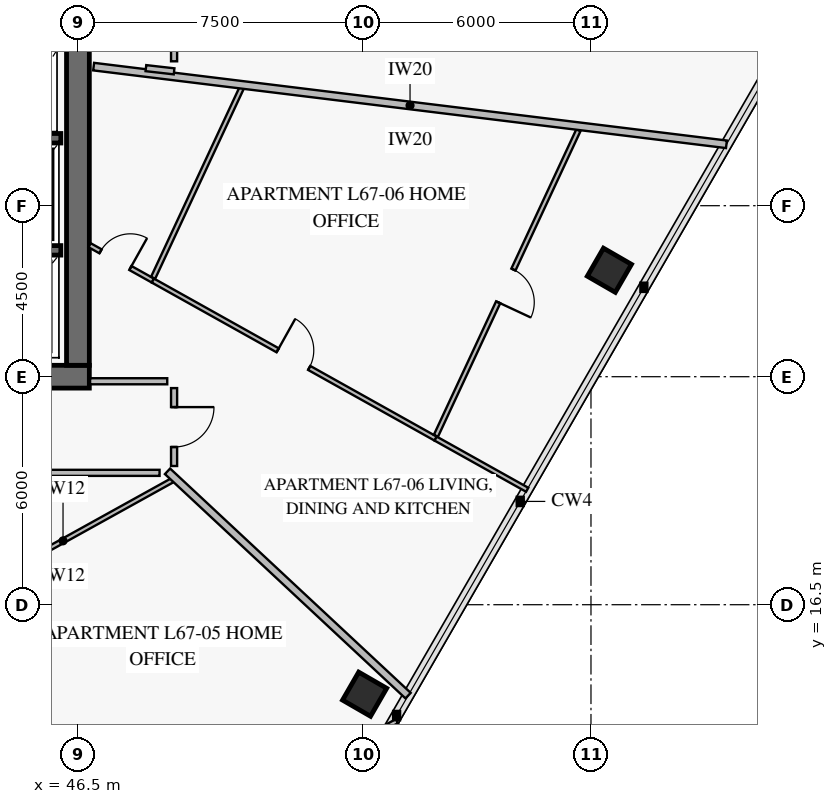
"""IFC4 building model, lengths in metres.
Left out: names, types, materials, properties, quantities, classifications, styles, units other than length and angle.
Written with IfcOpenShell. Run it as: python <this file> out.ifc"""

import sys

from ifc_helpers import new_model, si_unit, direction, frame, frame_2d, origin, origin_2d, place, context, subcontext, project, spatial, rectangle, extrude, element, fill, save


model = new_model("IFC4")
c1 = context("Model", 3, precision=1e-05, world=origin(), true_north=direction((0.0, 1.0)))
c2 = subcontext(c1, "Body", "Model", "MODEL_VIEW")
j1 = project(units=[si_unit("LENGTHUNIT", "METRE"), si_unit("PLANEANGLEUNIT", "RADIAN")], contexts=[c1])
p1 = place(None, origin())
s1 = spatial("IfcSite", under=j1, at=p1, CompositionType="ELEMENT")
p2 = place(p1, origin())
s2 = spatial("IfcBuilding", under=s1, at=p2, CompositionType="ELEMENT")
p3 = place(p2, frame((0.0, 0.0, 265.4)))
s3 = spatial("IfcBuildingStorey", under=s2, at=p3, CompositionType="ELEMENT", Elevation=265.4)
p4 = place(p3, frame((37.35, 22.5, 0.0), z_axis=(0.0, 0.0, 1.0), x_axis=(1.0, 0.0, 0.0)))
e1 = element("IfcWall", 1, at=p4, inside=s3, PredefinedType="SHEAR", context=c2, shape_type="SweptSolid", body=[
    extrude(rectangle(XDim=9.45, YDim=0.6, at=frame_2d((4.725, 0.0))), origin(), (0.0, 0.0, 1.0), 3.8),
])
p5 = place(p4, frame((3.95, 0.0, 0.0)))
e2 = element("IfcOpeningElement", 2, at=p5, cuts=e1, PredefinedType="OPENING", context=c2, shape_type="SweptSolid", body=[
    extrude(rectangle(XDim=1.5, YDim=2.15, at=frame_2d((0.75, 1.075))), frame((0.0, 0.312, 0.0), z_axis=(0.0, -1.0, 0.0), x_axis=(1.0, 0.0, 0.0)), (0.0, 0.0, 1.0), 0.624),
])
p6 = place(p3, frame((46.5, 22.8, 0.0), z_axis=(0.0, 0.0, 1.0), x_axis=(0.0, 1.0, 0.0)))
e3 = element("IfcWall", 3, at=p6, inside=s3, PredefinedType="SHEAR", context=c2, shape_type="SweptSolid", body=[
    extrude(rectangle(XDim=18.4, YDim=0.6, at=frame_2d((9.2, 0.0))), origin(), (0.0, 0.0, 1.0), 3.8),
])
p7 = place(p6, frame((8.95, 0.0, 0.0)))
e4 = element("IfcOpeningElement", 4, at=p7, cuts=e3, PredefinedType="OPENING", context=c2, shape_type="SweptSolid", body=[
    extrude(rectangle(XDim=1.1, YDim=2.15, at=frame_2d((0.55, 1.075))), frame((0.0, 0.312, 0.0), z_axis=(0.0, -1.0, 0.0), x_axis=(1.0, 0.0, 0.0)), (0.0, 0.0, 1.0), 0.624),
])
for number, where, z_axis, x_axis in (
    (5, (54.044, 14.145, 0.0), (0.0, 0.0, 1.0), (0.5, 0.866, 0.0)),
    (6, (60.485, 25.301, 0.0), (0.0, 0.0, 1.0), (0.5, 0.866, 0.0)),
):
    element("IfcColumn", number, at=place(p3, frame(where, z_axis=z_axis, x_axis=x_axis)), inside=s3, PredefinedType="COLUMN", context=c2, shape_type="SweptSolid", body=[
        extrude(rectangle(XDim=0.85, YDim=0.85, at=origin_2d()), origin(), (0.0, 0.0, 1.0), 3.55),
    ])
for number, where, z_axis, x_axis in (
    (7, (43.8, 25.825, 0.0), (0.0, 0.0, 1.0), (1.0, 0.0, 0.0)),
    (8, (43.8, 28.775, 0.0), (0.0, 0.0, 1.0), (1.0, 0.0, 0.0)),
):
    element("IfcWall", number, at=place(p3, frame(where, z_axis=z_axis, x_axis=x_axis)), inside=s3, PredefinedType="SOLIDWALL", context=c2, shape_type="SweptSolid", body=[
        extrude(rectangle(XDim=2.25, YDim=0.25, at=frame_2d((1.125, 0.0))), origin(), (0.0, 0.0, 1.0), 3.8),
    ])
p8 = place(p3, frame((43.155, 16.515, 0.0), z_axis=(0.0, 0.0, 1.0), x_axis=(0.419453006553, -0.907777051535, 0.0)))
e9 = element("IfcWall", 9, at=p8, inside=s3, PredefinedType="PARTITIONING", context=c2, shape_type="SweptSolid", body=[
    extrude(rectangle(XDim=8.43, YDim=0.12, at=frame_2d((4.215, 0.0))), origin(), (0.0, 0.0, 1.0), 2.93),
])
p9 = place(p8, frame((3.715, 0.0, 0.0)))
e10 = element("IfcOpeningElement", 10, at=p9, cuts=e9, PredefinedType="OPENING", context=c2, shape_type="SweptSolid", body=[
    extrude(rectangle(XDim=0.95, YDim=2.1, at=frame_2d((0.475, 1.05))), frame((0.0, 0.072, 0.0), z_axis=(0.0, -1.0, 0.0), x_axis=(1.0, 0.0, 0.0)), (0.0, 0.0, 1.0), 0.144),
])
p10 = place(p3, frame((46.74, 8.918, 0.0), z_axis=(0.0, 0.0, 1.0), x_axis=(0.874617638419, 0.484813352298, 0.0)))
e11 = element("IfcWall", 11, at=p10, inside=s3, PredefinedType="PARTITIONING", context=c2, shape_type="SweptSolid", body=[
    extrude(rectangle(XDim=9.323, YDim=0.12, at=frame_2d((4.661, 0.0))), origin(), (0.0, 0.0, 1.0), 3.55),
])
p11 = place(p10, frame((3.882, 0.0, 0.0)))
e12 = element("IfcOpeningElement", 12, at=p11, cuts=e11, PredefinedType="OPENING", context=c2, shape_type="SweptSolid", body=[
    extrude(rectangle(XDim=0.95, YDim=2.1, at=frame_2d((0.475, 1.05))), frame((0.0, 0.072, 0.0), z_axis=(0.0, -1.0, 0.0), x_axis=(1.0, 0.0, 0.0)), (0.0, 0.0, 1.0), 0.144),
])
p12 = place(p3, frame((46.808, 25.96, 0.0), z_axis=(0.0, 0.0, 1.0), x_axis=(0.872879297485, -0.487936196672, 0.0)))
e13 = element("IfcWall", 13, at=p12, inside=s3, PredefinedType="PARTITIONING", context=c2, shape_type="SweptSolid", body=[
    extrude(rectangle(XDim=1.906, YDim=0.12, at=frame_2d((0.953, 0.0))), origin(), (0.0, 0.0, 1.0), 3.55),
])
p13 = place(p12, frame((0.329, 0.0, 0.0)))
e14 = element("IfcOpeningElement", 14, at=p13, cuts=e13, PredefinedType="OPENING", context=c2, shape_type="SweptSolid", body=[
    extrude(rectangle(XDim=0.9, YDim=2.1, at=frame_2d((0.45, 1.05))), frame((0.0, 0.072, 0.0), z_axis=(0.0, -1.0, 0.0), x_axis=(1.0, 0.0, 0.0)), (0.0, 0.0, 1.0), 0.144),
])
p14 = place(p3, frame((48.472, 25.03, 0.0), z_axis=(0.0, 0.0, 1.0), x_axis=(0.872916935633, -0.487868858901, 0.0)))
e15 = element("IfcWall", 15, at=p14, inside=s3, PredefinedType="PARTITIONING", context=c2, shape_type="SweptSolid", body=[
    extrude(rectangle(XDim=8.524, YDim=0.12, at=frame_2d((4.262, 0.0))), origin(), (0.0, 0.0, 1.0), 3.15),
])
p15 = place(p14, frame((3.762, 0.0, 0.0)))
e16 = element("IfcOpeningElement", 16, at=p15, cuts=e15, PredefinedType="OPENING", context=c2, shape_type="SweptSolid", body=[
    extrude(rectangle(XDim=0.95, YDim=2.1, at=frame_2d((0.475, 1.05))), frame((0.0, 0.072, 0.0), z_axis=(0.0, -1.0, 0.0), x_axis=(1.0, 0.0, 0.0)), (0.0, 0.0, 1.0), 0.144),
])
p16 = place(p3, frame((55.92, 20.945, 0.0), z_axis=(0.0, 0.0, 1.0), x_axis=(0.422606705523, 0.9063131757, 0.0)))
e17 = element("IfcWall", 17, at=p16, inside=s3, PredefinedType="PARTITIONING", context=c2, shape_type="SweptSolid", body=[
    extrude(rectangle(XDim=8.871, YDim=0.12, at=frame_2d((4.435, 0.0))), origin(), (0.0, 0.0, 1.0), 2.95),
])
p17 = place(p16, frame((3.876, 0.0, 0.0)))
e18 = element("IfcOpeningElement", 18, at=p17, cuts=e17, PredefinedType="OPENING", context=c2, shape_type="SweptSolid", body=[
    extrude(rectangle(XDim=0.95, YDim=2.1, at=frame_2d((0.475, 1.05))), frame((0.0, 0.072, 0.0), z_axis=(0.0, -1.0, 0.0), x_axis=(1.0, 0.0, 0.0)), (0.0, 0.0, 1.0), 0.144),
])
p18 = place(p3, frame((49.03, 20.15, 0.0), z_axis=(0.0, 0.0, 1.0), x_axis=(0.0, 1.0, 0.0)))
e19 = element("IfcWall", 19, at=p18, inside=s3, PredefinedType="PARTITIONING", context=c2, shape_type="SweptSolid", body=[
    extrude(rectangle(XDim=2.05, YDim=0.16, at=frame_2d((1.025, 0.0))), origin(), (0.0, 0.0, 1.0), 3.55),
])
p19 = place(p18, frame((0.5, 0.0, 0.0)))
e20 = element("IfcOpeningElement", 20, at=p19, cuts=e19, PredefinedType="OPENING", context=c2, shape_type="SweptSolid", body=[
    extrude(rectangle(XDim=1.05, YDim=2.15, at=frame_2d((0.525, 1.075))), frame((0.0, 0.092, 0.0), z_axis=(0.0, -1.0, 0.0), x_axis=(1.0, 0.0, 0.0)), (0.0, 0.0, 1.0), 0.184),
])
p20 = place(p3, frame((49.03, 30.8, 0.0), z_axis=(0.0, 0.0, 1.0), x_axis=(0.0, 1.0, 0.0)))
e21 = element("IfcWall", 21, at=p20, inside=s3, PredefinedType="PARTITIONING", context=c2, shape_type="SweptSolid", body=[
    extrude(rectangle(XDim=2.734, YDim=0.16, at=frame_2d((1.367, 0.0))), origin(), (0.0, 0.0, 1.0), 3.55),
])
p21 = place(p20, frame((0.842, 0.0, 0.0)))
e22 = element("IfcOpeningElement", 22, at=p21, cuts=e21, PredefinedType="OPENING", context=c2, shape_type="SweptSolid", body=[
    extrude(rectangle(XDim=1.05, YDim=2.15, at=frame_2d((0.525, 1.075))), frame((0.0, 0.092, 0.0), z_axis=(0.0, -1.0, 0.0), x_axis=(1.0, 0.0, 0.0)), (0.0, 0.0, 1.0), 0.184),
])
p22 = place(p3, frame((43.204, 16.571, 0.0), z_axis=(0.0, 0.0, 1.0), x_axis=(0.874626847506, 0.48479673846, 0.0)))
e23 = element("IfcWall", 23, at=p22, inside=s3, PredefinedType="PARTITIONING", context=c2, shape_type="SweptSolid", body=[
    extrude(rectangle(XDim=6.64, YDim=0.12, at=frame_2d((3.32, 0.0))), origin(), (0.0, 0.0, 1.0), 2.95),
])
p23 = place(p3, frame((48.857, 20.01, 0.0), z_axis=(0.0, 0.0, 1.0), x_axis=(0.731342217011, -0.682010675589, 0.0)))
e24 = element("IfcWall", 24, at=p23, inside=s3, PredefinedType="PARTITIONING", context=c2, shape_type="SweptSolid", body=[
    extrude(rectangle(XDim=8.656, YDim=0.2, at=frame_2d((4.328, 0.0))), origin(), (0.0, 0.0, 1.0), 2.93),
])
p24 = place(p3, frame((55.913, 20.871, 0.0), z_axis=(0.0, 0.0, 1.0), x_axis=(0.872940157906, -0.487827306242, 0.0)))
e25 = element("IfcWall", 25, at=p24, inside=s3, PredefinedType="PARTITIONING", context=c2, shape_type="SweptSolid", body=[
    extrude(rectangle(XDim=2.76, YDim=0.12, at=frame_2d((1.38, 0.0))), origin(), (0.0, 0.0, 1.0), 2.93),
])
p25 = place(p3, frame((48.479, 25.104, 0.0), z_axis=(0.0, 0.0, 1.0), x_axis=(0.422623708153, 0.906305247313, 0.0)))
e26 = element("IfcWall", 26, at=p25, inside=s3, PredefinedType="PARTITIONING", context=c2, shape_type="SweptSolid", body=[
    extrude(rectangle(XDim=5.566, YDim=0.12, at=frame_2d((2.783, 0.0))), origin(), (0.0, 0.0, 1.0), 2.95),
])
p26 = place(p3, frame((46.913, 30.66, 0.0), z_axis=(0.0, 0.0, 1.0), x_axis=(0.992546420308, -0.121867155269, 0.0)))
e27 = element("IfcWall", 27, at=p26, inside=s3, PredefinedType="PARTITIONING", context=c2, shape_type="SweptSolid", body=[
    extrude(rectangle(XDim=16.776, YDim=0.2, at=frame_2d((8.388, 0.0))), origin(), (0.0, 0.0, 1.0), 2.93),
])
p27 = place(p3, frame((41.634, 19.97, 0.0), z_axis=(0.0, 0.0, 1.0), x_axis=(1.0, 0.0, 0.0)))
e28 = element("IfcWall", 28, at=p27, inside=s3, PredefinedType="PARTITIONING", context=c2, shape_type="SweptSolid", body=[
    extrude(rectangle(XDim=7.014, YDim=0.16, at=frame_2d((3.507, 0.0))), origin(), (0.0, 0.0, 1.0), 2.95),
])
p28 = place(p3, frame((48.85, 22.38, 0.0), z_axis=(0.0, 0.0, 1.0), x_axis=(-1.0, 0.0, 0.0)))
e29 = element("IfcWall", 29, at=p28, inside=s3, PredefinedType="PARTITIONING", context=c2, shape_type="SweptSolid", body=[
    extrude(rectangle(XDim=2.03, YDim=0.16, at=frame_2d((1.015, 0.0))), origin(), (0.0, 0.0, 1.0), 3.55),
])
p29 = place(p3, frame((49.03, 30.536, 0.0), z_axis=(0.0, 0.0, 1.0), x_axis=(-0.993568487463, 0.113232772287, 0.0)))
e30 = element("IfcWall", 30, at=p29, inside=s3, PredefinedType="PARTITIONING", context=c2, shape_type="SweptSolid", body=[
    extrude(rectangle(XDim=0.746, YDim=0.16, at=frame_2d((0.373, 0.0))), origin(), (0.0, 0.0, 1.0), 3.55),
])
p30 = place(p13, origin())
e31 = element("IfcDoor", 31, at=p30, inside=s3, OperationType="SINGLE_SWING_RIGHT", PredefinedType="DOOR", context=c2, shape_type="SweptSolid", body=[
    extrude(rectangle(XDim=0.9, YDim=2.1, at=frame_2d((0.45, 1.05))), frame((0.0, 0.025, 0.0), z_axis=(0.0, -1.0, 0.0), x_axis=(1.0, 0.0, 0.0)), (0.0, 0.0, 1.0), 0.05),
])
fill(e14, e31)
p31 = place(p15, origin())
e32 = element("IfcDoor", 32, at=p31, inside=s3, OperationType="SINGLE_SWING_LEFT", PredefinedType="DOOR", context=c2, shape_type="SweptSolid", body=[
    extrude(rectangle(XDim=0.95, YDim=2.1, at=frame_2d((0.475, 1.05))), frame((0.0, 0.025, 0.0), z_axis=(0.0, -1.0, 0.0), x_axis=(1.0, 0.0, 0.0)), (0.0, 0.0, 1.0), 0.05),
])
fill(e16, e32)
p32 = place(p17, frame((0.95, 0.0, 0.0), z_axis=(0.0, 0.0, 1.0), x_axis=(-1.0, 0.0, 0.0)))
e33 = element("IfcDoor", 33, at=p32, inside=s3, OperationType="SINGLE_SWING_RIGHT", PredefinedType="DOOR", context=c2, shape_type="SweptSolid", body=[
    extrude(rectangle(XDim=0.95, YDim=2.1, at=frame_2d((0.475, 1.05))), frame((0.0, 0.025, 0.0), z_axis=(0.0, -1.0, 0.0), x_axis=(1.0, 0.0, 0.0)), (0.0, 0.0, 1.0), 0.05),
])
fill(e18, e33)
p33 = place(p19, frame((1.05, 0.0, 0.0), z_axis=(0.0, 0.0, 1.0), x_axis=(-1.0, 0.0, 0.0)))
e34 = element("IfcDoor", 34, at=p33, inside=s3, OperationType="SINGLE_SWING_LEFT", PredefinedType="DOOR", context=c2, shape_type="SweptSolid", body=[
    extrude(rectangle(XDim=1.05, YDim=2.15, at=frame_2d((0.525, 1.075))), frame((0.0, 0.025, 0.0), z_axis=(0.0, -1.0, 0.0), x_axis=(1.0, 0.0, 0.0)), (0.0, 0.0, 1.0), 0.05),
])
fill(e20, e34)
save(model, sys.argv[1])
